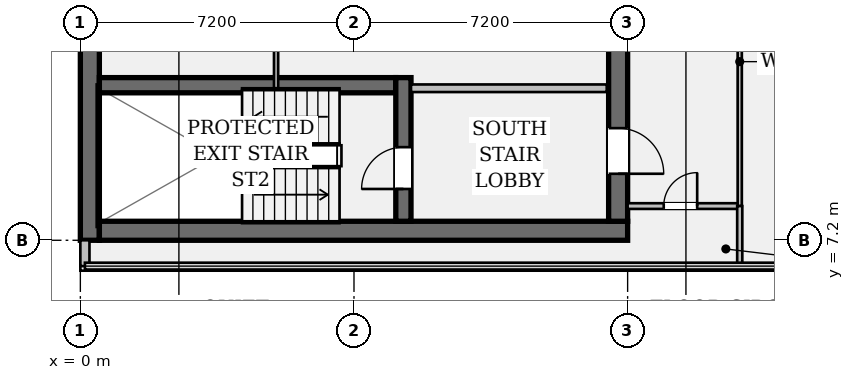
"""IFC4 building model, lengths in metres.
Left out: names, types, materials, properties, quantities, classifications, styles, units other than length and angle.
Written with IfcOpenShell. Run it as: python <this file> out.ifc"""

import sys

from ifc_helpers import new_model, si_unit, direction, frame, frame_2d, origin, place, context, subcontext, project, spatial, rectangle, extrude, element, fill, save


model = new_model("IFC4")
c1 = context("Model", 3, precision=1e-05, world=origin(), true_north=direction((0.0, 1.0)))
c2 = subcontext(c1, "Body", "Model", "MODEL_VIEW")
j1 = project(units=[si_unit("LENGTHUNIT", "METRE"), si_unit("PLANEANGLEUNIT", "RADIAN")], contexts=[c1])
p1 = place(None, origin())
s1 = spatial("IfcSite", under=j1, at=p1, CompositionType="ELEMENT")
p2 = place(p1, origin())
s2 = spatial("IfcBuilding", under=s1, at=p2, CompositionType="ELEMENT")
p3 = place(p2, frame((0.0, 0.0, 283.15)))
s3 = spatial("IfcBuildingStorey", under=s2, at=p3, CompositionType="ELEMENT", Elevation=283.15)
p4 = place(p3, frame((0.25, 7.2, 0.0), z_axis=(0.0, 0.0, 1.0), x_axis=(0.0, 1.0, 0.0)))
e1 = element("IfcWall", 1, at=p4, inside=s3, PredefinedType="SHEAR", context=c2, shape_type="SweptSolid", body=[
    extrude(rectangle(XDim=28.8, YDim=0.5, at=frame_2d((14.4, 0.0))), origin(), (0.0, 0.0, 1.0), 3.24),
])
p5 = place(p3, frame((0.5, 7.45, 0.0), z_axis=(0.0, 0.0, 1.0), x_axis=(1.0, 0.0, 0.0)))
e2 = element("IfcWall", 2, at=p5, inside=s3, PredefinedType="SHEAR", context=c2, shape_type="SweptSolid", body=[
    extrude(rectangle(XDim=13.9, YDim=0.5, at=frame_2d((6.95, 0.0))), origin(), (0.0, 0.0, 1.0), 3.24),
])
p6 = place(p3, frame((14.15, 35.5, 0.0), z_axis=(0.0, 0.0, 1.0), x_axis=(0.0, -1.0, 0.0)))
e3 = element("IfcWall", 3, at=p6, inside=s3, PredefinedType="SHEAR", context=c2, shape_type="SweptSolid", body=[
    extrude(rectangle(XDim=27.8, YDim=0.5, at=frame_2d((13.9, 0.0))), origin(), (0.0, 0.0, 1.0), 3.24),
])
p7 = place(p6, frame((1.4, 0.0, 0.0)))
e4 = element("IfcOpeningElement", 4, at=p7, cuts=e3, PredefinedType="OPENING", context=c2, shape_type="SweptSolid", body=[
    extrude(rectangle(XDim=1.2, YDim=2.15, at=frame_2d((0.6, 1.075))), frame((0.0, 0.262, 0.0), z_axis=(0.0, -1.0, 0.0), x_axis=(1.0, 0.0, 0.0)), (0.0, 0.0, 1.0), 0.524),
])
p8 = place(p6, frame((25.35, 0.0, 0.0)))
e5 = element("IfcOpeningElement", 5, at=p8, cuts=e3, PredefinedType="OPENING", context=c2, shape_type="SweptSolid", body=[
    extrude(rectangle(XDim=1.2, YDim=2.15, at=frame_2d((0.6, 1.075))), frame((0.0, 0.262, 0.0), z_axis=(0.0, -1.0, 0.0), x_axis=(1.0, 0.0, 0.0)), (0.0, 0.0, 1.0), 0.524),
])
p9 = place(p6, frame((14.7, 0.0, 0.0)))
e6 = element("IfcOpeningElement", 6, at=p9, cuts=e3, PredefinedType="OPENING", context=c2, shape_type="SweptSolid", body=[
    extrude(rectangle(XDim=1.6, YDim=2.2, at=frame_2d((0.8, 1.1))), frame((0.0, 0.262, 0.0), z_axis=(0.0, -1.0, 0.0), x_axis=(1.0, 0.0, 0.0)), (0.0, 0.0, 1.0), 0.524),
])
p10 = place(p3, frame((0.5, 11.28, 0.0), z_axis=(0.0, 0.0, 1.0), x_axis=(1.0, 0.0, 0.0)))
e7 = element("IfcWall", 7, at=p10, inside=s3, PredefinedType="SHEAR", context=c2, shape_type="SweptSolid", body=[
    extrude(rectangle(XDim=7.8, YDim=0.4, at=frame_2d((3.9, 0.0))), origin(), (0.0, 0.0, 1.0), 3.24),
])
p11 = place(p3, frame((8.5, 7.7, 0.0), z_axis=(0.0, 0.0, 1.0), x_axis=(0.0, 1.0, 0.0)))
e8 = element("IfcWall", 8, at=p11, inside=s3, PredefinedType="SHEAR", context=c2, shape_type="SweptSolid", body=[
    extrude(rectangle(XDim=3.78, YDim=0.4, at=frame_2d((1.89, 0.0))), origin(), (0.0, 0.0, 1.0), 3.24),
])
p12 = place(p11, frame((0.85, 0.0, 0.0)))
e9 = element("IfcOpeningElement", 9, at=p12, cuts=e8, PredefinedType="OPENING", context=c2, shape_type="SweptSolid", body=[
    extrude(rectangle(XDim=1.1, YDim=2.15, at=frame_2d((0.55, 1.075))), frame((0.0, 0.212, 0.0), z_axis=(0.0, -1.0, 0.0), x_axis=(1.0, 0.0, 0.0)), (0.0, 0.0, 1.0), 0.424),
])
p13 = place(p3, frame((0.12, 6.52, 0.0), z_axis=(0.0, 0.0, 1.0), x_axis=(0.0, 1.0, 0.0)))
e10 = element("IfcWall", 10, at=p13, inside=s3, PredefinedType="STANDARD", context=c2, shape_type="SweptSolid", body=[
    extrude(rectangle(XDim=0.68, YDim=0.24, at=frame_2d((0.34, 0.0))), origin(), (0.0, 0.0, 1.0), 3.24),
])
p14 = place(p3, frame((8.7, 11.2, 0.0), z_axis=(0.0, 0.0, 1.0), x_axis=(1.0, 0.0, 0.0)))
e11 = element("IfcWall", 11, at=p14, inside=s3, PredefinedType="PARTITIONING", context=c2, shape_type="SweptSolid", body=[
    extrude(rectangle(XDim=5.15, YDim=0.2, at=frame_2d((2.575, 0.0))), origin(), (0.0, 0.0, 1.0), 3.24),
])
p15 = place(p3, frame((5.15, 11.2, 0.0), z_axis=(0.0, 0.0, 1.0), x_axis=(0.0, 1.0, 0.0)))
e12 = element("IfcWall", 12, at=p15, inside=s3, PredefinedType="PARTITIONING", context=c2, shape_type="SweptSolid", body=[
    extrude(rectangle(XDim=6.6, YDim=0.11, at=frame_2d((3.3, 0.0))), origin(), (0.0, 0.0, 1.0), 3.24),
])
p16 = place(p3, frame((14.4, 8.1, 0.0), z_axis=(0.0, 0.0, 1.0), x_axis=(1.0, 0.0, 0.0)))
e13 = element("IfcWall", 13, at=p16, inside=s3, PredefinedType="PARTITIONING", context=c2, shape_type="SweptSolid", body=[
    extrude(rectangle(XDim=2.95, YDim=0.15, at=frame_2d((1.475, 0.0))), origin(), (0.0, 0.0, 1.0), 3.24),
])
p17 = place(p16, frame((0.95, 0.0, 0.0)))
e14 = element("IfcOpeningElement", 14, at=p17, cuts=e13, PredefinedType="OPENING", context=c2, shape_type="SweptSolid", body=[
    extrude(rectangle(XDim=0.88, YDim=2.15, at=frame_2d((0.44, 1.075))), frame((0.0, 0.087, 0.0), z_axis=(0.0, -1.0, 0.0), x_axis=(1.0, 0.0, 0.0)), (0.0, 0.0, 1.0), 0.174),
])
p18 = place(p3, frame((17.35, 8.1, 0.0), z_axis=(0.0, 0.0, 1.0), x_axis=(0.0, 1.0, 0.0)))
e15 = element("IfcWall", 15, at=p18, inside=s3, PredefinedType="PARTITIONING", context=c2, shape_type="SweptSolid", body=[
    extrude(rectangle(XDim=7.6, YDim=0.11, at=frame_2d((3.8, 0.0))), origin(), (0.0, 0.0, 1.0), 2.676),
])
p19 = place(p3, frame((17.35, 6.52, 0.0), z_axis=(0.0, 0.0, 1.0), x_axis=(0.0, 1.0, 0.0)))
e16 = element("IfcWall", 16, at=p19, inside=s3, PredefinedType="PARTITIONING", context=c2, shape_type="SweptSolid", body=[
    extrude(rectangle(XDim=1.58, YDim=0.135, at=frame_2d((0.79, 0.0))), origin(), (0.0, 0.0, 1.0), 3.24),
])
p20 = place(p12, origin())
e17 = element("IfcDoor", 17, at=p20, inside=s3, OperationType="SINGLE_SWING_LEFT", PredefinedType="DOOR", context=c2, shape_type="SweptSolid", body=[
    extrude(rectangle(XDim=1.1, YDim=2.15, at=frame_2d((0.55, 1.075))), frame((0.0, 0.025, 0.0), z_axis=(0.0, -1.0, 0.0), x_axis=(1.0, 0.0, 0.0)), (0.0, 0.0, 1.0), 0.05),
])
fill(e9, e17)
p21 = place(p8, origin())
e18 = element("IfcDoor", 18, at=p21, inside=s3, OperationType="SINGLE_SWING_RIGHT", PredefinedType="DOOR", context=c2, shape_type="SweptSolid", body=[
    extrude(rectangle(XDim=1.2, YDim=2.15, at=frame_2d((0.6, 1.075))), frame((0.0, 0.025, 0.0), z_axis=(0.0, -1.0, 0.0), x_axis=(1.0, 0.0, 0.0)), (0.0, 0.0, 1.0), 0.05),
])
fill(e5, e18)
p22 = place(p17, origin())
e19 = element("IfcDoor", 19, at=p22, inside=s3, OperationType="SINGLE_SWING_RIGHT", PredefinedType="DOOR", context=c2, shape_type="SweptSolid", body=[
    extrude(rectangle(XDim=0.88, YDim=2.15, at=frame_2d((0.44, 1.075))), frame((0.0, 0.025, 0.0), z_axis=(0.0, -1.0, 0.0), x_axis=(1.0, 0.0, 0.0)), (0.0, 0.0, 1.0), 0.05),
])
fill(e14, e19)
save(model, sys.argv[1])
